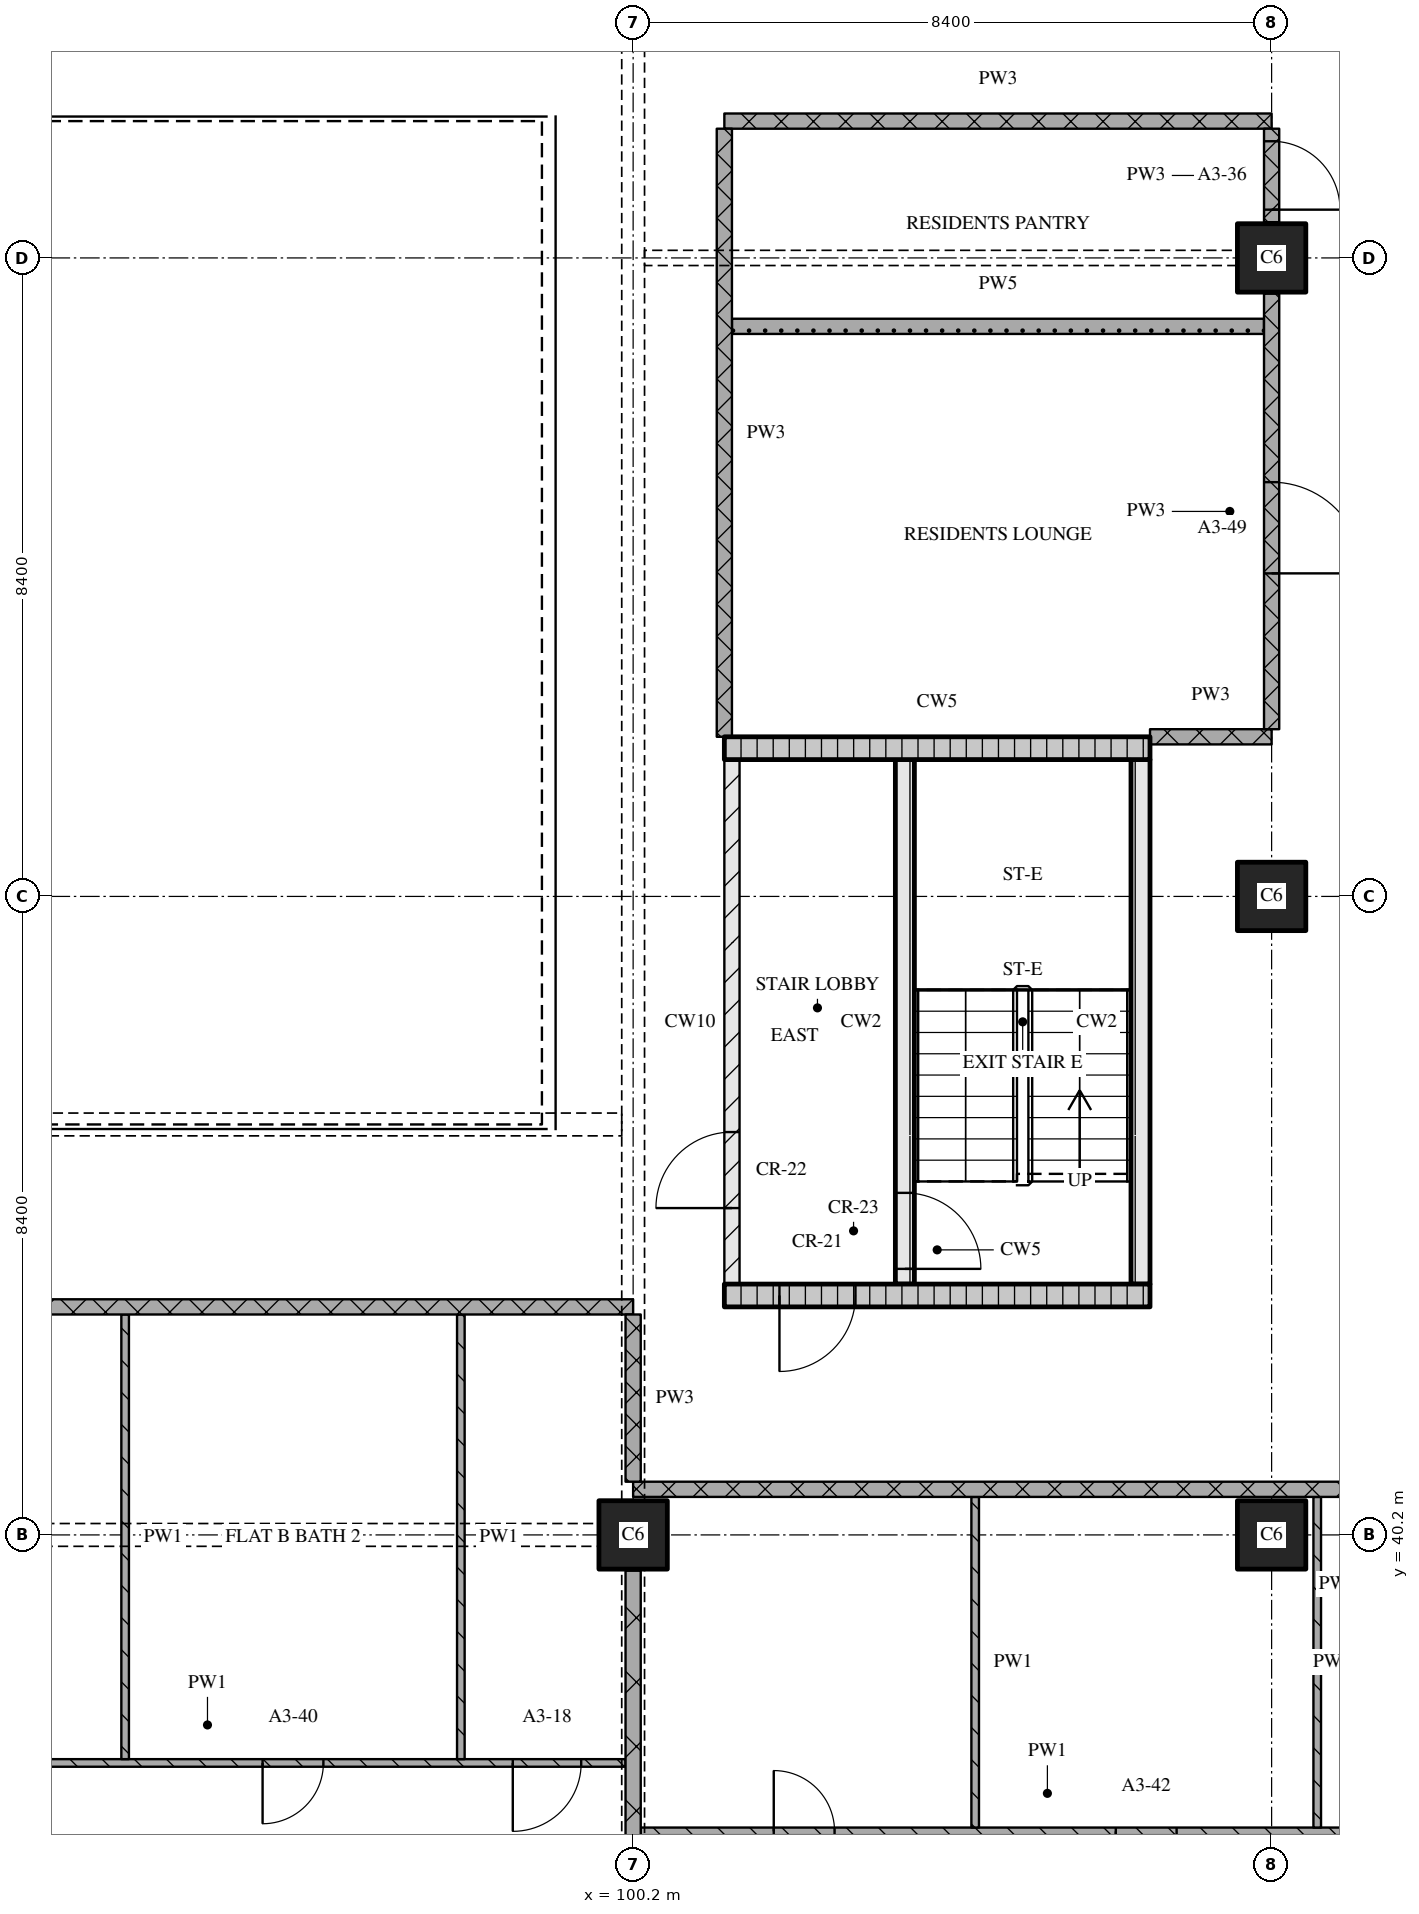
"""IFC4 building model, lengths in metres.
Left out: names, types, materials, properties, quantities, classifications, styles, units other than length and angle.
Written with IfcOpenShell. Run it as: python <this file> out.ifc"""

import sys

from ifc_helpers import new_model, si_unit, direction, frame, frame_2d, origin, origin_2d, place, context, subcontext, project, spatial, rectangle, extrude, element, fill, save


model = new_model("IFC4")
c1 = context("Model", 3, precision=1e-05, world=origin(), true_north=direction((0.0, 1.0)))
c2 = subcontext(c1, "Body", "Model", "MODEL_VIEW")
j1 = project(units=[si_unit("LENGTHUNIT", "METRE"), si_unit("PLANEANGLEUNIT", "RADIAN")], contexts=[c1])
p1 = place(None, origin())
s1 = spatial("IfcSite", under=j1, at=p1, CompositionType="ELEMENT")
p2 = place(p1, origin())
s2 = spatial("IfcBuilding", under=s1, at=p2, CompositionType="ELEMENT")
p3 = place(p2, frame((0.0, 0.0, 66.0)))
s3 = spatial("IfcBuildingStorey", under=s2, at=p3, CompositionType="ELEMENT", Elevation=66.0)
for number, where, z_axis, x_axis in (
    (1, (100.2, 40.2, 0.0), (0.0, 0.0, 1.0), (1.0, 0.0, 0.0)),
    (2, (108.6, 40.2, 0.0), (0.0, 0.0, 1.0), (1.0, 0.0, 0.0)),
    (3, (108.6, 48.6, 0.0), (0.0, 0.0, 1.0), (1.0, 0.0, 0.0)),
    (4, (108.6, 57.0, 0.0), (0.0, 0.0, 1.0), (1.0, 0.0, 0.0)),
):
    element("IfcColumn", number, at=place(p3, frame(where, z_axis=z_axis, x_axis=x_axis)), inside=s3, PredefinedType="COLUMN", context=c2, shape_type="SweptSolid", body=[
        extrude(rectangle(XDim=0.9, YDim=0.9, at=origin_2d()), origin(), (0.0, 0.0, 1.0), 3.6),
    ])
p4 = place(p3, frame((101.4, 43.35, 0.0), z_axis=(0.0, 0.0, 1.0), x_axis=(1.0, 0.0, 0.0)))
e5 = element("IfcWall", 5, at=p4, inside=s3, PredefinedType="SOLIDWALL", context=c2, shape_type="SweptSolid", body=[
    extrude(rectangle(XDim=5.6, YDim=0.3, at=frame_2d((2.8, 0.0))), origin(), (0.0, 0.0, 1.0), 3.32),
])
p5 = place(p4, frame((0.725, 0.0, 0.0)))
e6 = element("IfcOpeningElement", 6, at=p5, cuts=e5, PredefinedType="OPENING", context=c2, shape_type="SweptSolid", body=[
    extrude(rectangle(XDim=1.0, YDim=2.1, at=frame_2d((0.5, 1.05))), frame((0.0, 0.16, 0.0), z_axis=(0.0, -1.0, 0.0), x_axis=(1.0, 0.0, 0.0)), (0.0, 0.0, 1.0), 0.32),
])
p6 = place(p3, frame((101.5, 43.5, 0.0), z_axis=(0.0, 0.0, 1.0), x_axis=(0.0, 1.0, 0.0)))
e7 = element("IfcWall", 7, at=p6, inside=s3, PredefinedType="PARTITIONING", context=c2, shape_type="SweptSolid", body=[
    extrude(rectangle(XDim=6.9, YDim=0.2, at=frame_2d((3.45, 0.0))), origin(), (0.0, 0.0, 1.0), 3.32),
])
p7 = place(p6, frame((1.0, 0.0, 0.0)))
e8 = element("IfcOpeningElement", 8, at=p7, cuts=e7, PredefinedType="OPENING", context=c2, shape_type="SweptSolid", body=[
    extrude(rectangle(XDim=1.0, YDim=2.1, at=frame_2d((0.5, 1.05))), frame((0.0, 0.11, 0.0), z_axis=(0.0, -1.0, 0.0), x_axis=(1.0, 0.0, 0.0)), (0.0, 0.0, 1.0), 0.22),
])
p8 = place(p3, frame((103.775, 43.5, 0.0), z_axis=(0.0, 0.0, 1.0), x_axis=(0.0, 1.0, 0.0)))
e9 = element("IfcWall", 9, at=p8, inside=s3, PredefinedType="SOLIDWALL", context=c2, shape_type="SweptSolid", body=[
    extrude(rectangle(XDim=6.9, YDim=0.25, at=frame_2d((3.45, 0.0))), origin(), (0.0, 0.0, 1.0), 3.32),
])
p9 = place(p8, frame((0.2, 0.0, 0.0)))
e10 = element("IfcOpeningElement", 10, at=p9, cuts=e9, PredefinedType="OPENING", context=c2, shape_type="SweptSolid", body=[
    extrude(rectangle(XDim=1.0, YDim=2.1, at=frame_2d((0.5, 1.05))), frame((0.0, 0.135, 0.0), z_axis=(0.0, -1.0, 0.0), x_axis=(1.0, 0.0, 0.0)), (0.0, 0.0, 1.0), 0.27),
])
p10 = place(p3, frame((106.875, 43.5, 0.0), z_axis=(0.0, 0.0, 1.0), x_axis=(0.0, 1.0, 0.0)))
e11 = element("IfcWall", 11, at=p10, inside=s3, PredefinedType="SOLIDWALL", context=c2, shape_type="SweptSolid", body=[
    extrude(rectangle(XDim=6.9, YDim=0.25, at=frame_2d((3.45, 0.0))), origin(), (0.0, 0.0, 1.0), 3.32),
])
p11 = place(p3, frame((101.4, 50.55, 0.0), z_axis=(0.0, 0.0, 1.0), x_axis=(1.0, 0.0, 0.0)))
e12 = element("IfcWall", 12, at=p11, inside=s3, PredefinedType="SOLIDWALL", context=c2, shape_type="SweptSolid", body=[
    extrude(rectangle(XDim=5.6, YDim=0.3, at=frame_2d((2.8, 0.0))), origin(), (0.0, 0.0, 1.0), 3.32),
])
p12 = place(p3, frame((100.3, 36.3, 0.0), z_axis=(0.0, 0.0, 1.0), x_axis=(1.0, 0.0, 0.0)))
e13 = element("IfcWall", 13, at=p12, inside=s3, PredefinedType="PARTITIONING", context=c2, shape_type="SweptSolid", body=[
    extrude(rectangle(XDim=10.7, YDim=0.1, at=frame_2d((5.35, 0.0))), origin(), (0.0, 0.0, 1.0), 3.32),
])
p13 = place(p12, frame((1.75, 0.0, 0.0)))
e14 = element("IfcOpeningElement", 14, at=p13, cuts=e13, PredefinedType="OPENING", context=c2, shape_type="SweptSolid", body=[
    extrude(rectangle(XDim=0.8, YDim=2.1, at=frame_2d((0.4, 1.05))), frame((0.0, 0.06, 0.0), z_axis=(0.0, -1.0, 0.0), x_axis=(1.0, 0.0, 0.0)), (0.0, 0.0, 1.0), 0.12),
])
p14 = place(p12, frame((6.25, 0.0, 0.0)))
e15 = element("IfcOpeningElement", 15, at=p14, cuts=e13, PredefinedType="OPENING", context=c2, shape_type="SweptSolid", body=[
    extrude(rectangle(XDim=0.8, YDim=2.1, at=frame_2d((0.4, 1.05))), frame((0.0, 0.06, 0.0), z_axis=(0.0, -1.0, 0.0), x_axis=(1.0, 0.0, 0.0)), (0.0, 0.0, 1.0), 0.12),
])
p15 = place(p3, frame((89.1, 37.2, 0.0), z_axis=(0.0, 0.0, 1.0), x_axis=(1.0, 0.0, 0.0)))
e16 = element("IfcWall", 16, at=p15, inside=s3, PredefinedType="PARTITIONING", context=c2, shape_type="SweptSolid", body=[
    extrude(rectangle(XDim=11.0, YDim=0.1, at=frame_2d((5.5, 0.0))), origin(), (0.0, 0.0, 1.0), 3.32),
])
p16 = place(p15, frame((6.225, 0.0, 0.0)))
e17 = element("IfcOpeningElement", 17, at=p16, cuts=e16, PredefinedType="OPENING", context=c2, shape_type="SweptSolid", body=[
    extrude(rectangle(XDim=0.8, YDim=2.1, at=frame_2d((0.4, 1.05))), frame((0.0, 0.06, 0.0), z_axis=(0.0, -1.0, 0.0), x_axis=(1.0, 0.0, 0.0)), (0.0, 0.0, 1.0), 0.12),
])
p17 = place(p15, frame((9.517, 0.0, 0.0)))
e18 = element("IfcOpeningElement", 18, at=p17, cuts=e16, PredefinedType="OPENING", context=c2, shape_type="SweptSolid", body=[
    extrude(rectangle(XDim=0.9, YDim=2.1, at=frame_2d((0.45, 1.05))), frame((0.0, 0.06, 0.0), z_axis=(0.0, -1.0, 0.0), x_axis=(1.0, 0.0, 0.0)), (0.0, 0.0, 1.0), 0.12),
])
p18 = place(p3, frame((124.28, 40.8, 0.0), z_axis=(0.0, 0.0, 1.0), x_axis=(-1.0, 0.0, 0.0)))
e19 = element("IfcWall", 19, at=p18, inside=s3, PredefinedType="PARTITIONING", context=c2, shape_type="SweptSolid", body=[
    extrude(rectangle(XDim=24.08, YDim=0.2, at=frame_2d((12.04, 0.0))), origin(), (0.0, 0.0, 1.0), 3.32),
])
p19 = place(p18, frame((12.03, 0.0, 0.0)))
e20 = element("IfcOpeningElement", 20, at=p19, cuts=e19, PredefinedType="OPENING", context=c2, shape_type="SweptSolid", body=[
    extrude(rectangle(XDim=1.0, YDim=2.1, at=frame_2d((0.5, 1.05))), frame((0.0, 0.11, 0.0), z_axis=(0.0, -1.0, 0.0), x_axis=(1.0, 0.0, 0.0)), (0.0, 0.0, 1.0), 0.22),
])
p20 = place(p3, frame((100.2, 43.2, 0.0), z_axis=(0.0, 0.0, 1.0), x_axis=(-1.0, 0.0, 0.0)))
e21 = element("IfcWall", 21, at=p20, inside=s3, PredefinedType="PARTITIONING", context=c2, shape_type="SweptSolid", body=[
    extrude(rectangle(XDim=25.2, YDim=0.2, at=frame_2d((12.6, 0.0))), origin(), (0.0, 0.0, 1.0), 3.32),
])
p21 = place(p20, frame((11.35, 0.0, 0.0)))
e22 = element("IfcOpeningElement", 22, at=p21, cuts=e21, PredefinedType="OPENING", context=c2, shape_type="SweptSolid", body=[
    extrude(rectangle(XDim=1.0, YDim=2.1, at=frame_2d((0.5, 1.05))), frame((0.0, 0.11, 0.0), z_axis=(0.0, -1.0, 0.0), x_axis=(1.0, 0.0, 0.0)), (0.0, 0.0, 1.0), 0.22),
])
p22 = place(p3, frame((107.0, 50.7, 0.0), z_axis=(0.0, 0.0, 1.0), x_axis=(1.0, 0.0, 0.0)))
e23 = element("IfcWall", 23, at=p22, inside=s3, PredefinedType="PARTITIONING", context=c2, shape_type="SweptSolid", body=[
    extrude(rectangle(XDim=1.6, YDim=0.2, at=frame_2d((0.8, 0.0))), origin(), (0.0, 0.0, 1.0), 3.32),
])
p23 = place(p3, frame((101.5, 56.1, 0.0), z_axis=(0.0, 0.0, 1.0), x_axis=(1.0, 0.0, 0.0)))
e24 = element("IfcWall", 24, at=p23, inside=s3, PredefinedType="PARTITIONING", context=c2, shape_type="SweptSolid", body=[
    extrude(rectangle(XDim=7.0, YDim=0.2, at=frame_2d((3.5, 0.0))), origin(), (0.0, 0.0, 1.0), 3.32),
])
p24 = place(p3, frame((101.4, 58.8, 0.0), z_axis=(0.0, 0.0, 1.0), x_axis=(1.0, 0.0, 0.0)))
e25 = element("IfcWall", 25, at=p24, inside=s3, PredefinedType="PARTITIONING", context=c2, shape_type="SweptSolid", body=[
    extrude(rectangle(XDim=7.2, YDim=0.2, at=frame_2d((3.6, 0.0))), origin(), (0.0, 0.0, 1.0), 3.32),
])
for number, where, z_axis, x_axis in (
    (26, (93.517, 43.1, 0.0), (0.0, 0.0, 1.0), (0.0, -1.0, 0.0)),
    (27, (97.933, 43.1, 0.0), (0.0, 0.0, 1.0), (0.0, -1.0, 0.0)),
):
    element("IfcWall", number, at=place(p3, frame(where, z_axis=z_axis, x_axis=x_axis)), inside=s3, PredefinedType="PARTITIONING", context=c2, shape_type="SweptSolid", body=[
        extrude(rectangle(XDim=5.85, YDim=0.1, at=frame_2d((2.925, 0.0))), origin(), (0.0, 0.0, 1.0), 3.32),
    ])
p25 = place(p3, frame((100.2, 43.1, 0.0), z_axis=(0.0, 0.0, 1.0), x_axis=(0.0, -1.0, 0.0)))
e28 = element("IfcWall", 28, at=p25, inside=s3, PredefinedType="PARTITIONING", context=c2, shape_type="SweptSolid", body=[
    extrude(rectangle(XDim=2.2, YDim=0.2, at=frame_2d((1.1, 0.0))), origin(), (0.0, 0.0, 1.0), 2.43),
])
p26 = place(p3, frame((100.2, 39.73, 0.0), z_axis=(0.0, 0.0, 1.0), x_axis=(0.0, -1.0, 0.0)))
e29 = element("IfcWall", 29, at=p26, inside=s3, PredefinedType="PARTITIONING", context=c2, shape_type="SweptSolid", body=[
    extrude(rectangle(XDim=7.46, YDim=0.2, at=frame_2d((3.73, 0.0))), origin(), (0.0, 0.0, 1.0), 2.83),
])
p27 = place(p3, frame((101.4, 58.7, 0.0), z_axis=(0.0, 0.0, 1.0), x_axis=(0.0, -1.0, 0.0)))
e30 = element("IfcWall", 30, at=p27, inside=s3, PredefinedType="PARTITIONING", context=c2, shape_type="SweptSolid", body=[
    extrude(rectangle(XDim=8.0, YDim=0.2, at=frame_2d((4.0, 0.0))), origin(), (0.0, 0.0, 1.0), 3.32),
])
p28 = place(p3, frame((104.7, 40.7, 0.0), z_axis=(0.0, 0.0, 1.0), x_axis=(0.0, -1.0, 0.0)))
e31 = element("IfcWall", 31, at=p28, inside=s3, PredefinedType="PARTITIONING", context=c2, shape_type="SweptSolid", body=[
    extrude(rectangle(XDim=4.35, YDim=0.1, at=frame_2d((2.175, 0.0))), origin(), (0.0, 0.0, 1.0), 3.32),
])
p29 = place(p3, frame((108.6, 50.8, 0.0), z_axis=(0.0, 0.0, 1.0), x_axis=(0.0, 1.0, 0.0)))
e32 = element("IfcWall", 32, at=p29, inside=s3, PredefinedType="PARTITIONING", context=c2, shape_type="SweptSolid", body=[
    extrude(rectangle(XDim=5.73, YDim=0.2, at=frame_2d((2.865, 0.0))), origin(), (0.0, 0.0, 1.0), 3.32),
])
p30 = place(p29, frame((2.05, 0.0, 0.0)))
e33 = element("IfcOpeningElement", 33, at=p30, cuts=e32, PredefinedType="OPENING", context=c2, shape_type="SweptSolid", body=[
    extrude(rectangle(XDim=1.2, YDim=2.1, at=frame_2d((0.6, 1.05))), frame((0.0, 0.11, 0.0), z_axis=(0.0, -1.0, 0.0), x_axis=(1.0, 0.0, 0.0)), (0.0, 0.0, 1.0), 0.22),
])
p31 = place(p3, frame((108.6, 57.47, 0.0), z_axis=(0.0, 0.0, 1.0), x_axis=(0.0, 1.0, 0.0)))
e34 = element("IfcWall", 34, at=p31, inside=s3, PredefinedType="PARTITIONING", context=c2, shape_type="SweptSolid", body=[
    extrude(rectangle(XDim=1.23, YDim=0.2, at=frame_2d((0.615, 0.0))), origin(), (0.0, 0.0, 1.0), 3.32),
])
p32 = place(p31, frame((0.165, 0.0, 0.0)))
e35 = element("IfcOpeningElement", 35, at=p32, cuts=e34, PredefinedType="OPENING", context=c2, shape_type="SweptSolid", body=[
    extrude(rectangle(XDim=0.9, YDim=2.1, at=frame_2d((0.45, 1.05))), frame((0.0, 0.11, 0.0), z_axis=(0.0, -1.0, 0.0), x_axis=(1.0, 0.0, 0.0)), (0.0, 0.0, 1.0), 0.22),
])
p33 = place(p3, frame((109.2, 40.7, 0.0), z_axis=(0.0, 0.0, 1.0), x_axis=(0.0, -1.0, 0.0)))
e36 = element("IfcWall", 36, at=p33, inside=s3, PredefinedType="PARTITIONING", context=c2, shape_type="SweptSolid", body=[
    extrude(rectangle(XDim=4.35, YDim=0.1, at=frame_2d((2.175, 0.0))), origin(), (0.0, 0.0, 1.0), 3.32),
])
p34 = place(p5, origin())
e37 = element("IfcDoor", 37, at=p34, inside=s3, OperationType="SINGLE_SWING_RIGHT", PredefinedType="DOOR", context=c2, shape_type="SweptSolid", body=[
    extrude(rectangle(XDim=1.0, YDim=2.1, at=frame_2d((0.5, 1.05))), frame((0.0, 0.025, 0.0), z_axis=(0.0, -1.0, 0.0), x_axis=(1.0, 0.0, 0.0)), (0.0, 0.0, 1.0), 0.05),
])
fill(e6, e37)
p35 = place(p9, origin())
e38 = element("IfcDoor", 38, at=p35, inside=s3, OperationType="SINGLE_SWING_RIGHT", PredefinedType="DOOR", context=c2, shape_type="SweptSolid", body=[
    extrude(rectangle(XDim=1.0, YDim=2.1, at=frame_2d((0.5, 1.05))), frame((0.0, 0.025, 0.0), z_axis=(0.0, -1.0, 0.0), x_axis=(1.0, 0.0, 0.0)), (0.0, 0.0, 1.0), 0.05),
])
fill(e10, e38)
p36 = place(p7, origin())
e39 = element("IfcDoor", 39, at=p36, inside=s3, OperationType="SINGLE_SWING_LEFT", PredefinedType="DOOR", context=c2, shape_type="SweptSolid", body=[
    extrude(rectangle(XDim=1.0, YDim=2.1, at=frame_2d((0.5, 1.05))), frame((0.0, 0.025, 0.0), z_axis=(0.0, -1.0, 0.0), x_axis=(1.0, 0.0, 0.0)), (0.0, 0.0, 1.0), 0.05),
])
fill(e8, e39)
p37 = place(p13, origin())
e40 = element("IfcDoor", 40, at=p37, inside=s3, OperationType="SINGLE_SWING_LEFT", PredefinedType="DOOR", context=c2, shape_type="SweptSolid", body=[
    extrude(rectangle(XDim=0.8, YDim=2.1, at=frame_2d((0.4, 1.05))), frame((0.0, 0.025, 0.0), z_axis=(0.0, -1.0, 0.0), x_axis=(1.0, 0.0, 0.0)), (0.0, 0.0, 1.0), 0.05),
])
fill(e14, e40)
p38 = place(p14, origin())
e41 = element("IfcDoor", 41, at=p38, inside=s3, OperationType="SINGLE_SWING_RIGHT", PredefinedType="DOOR", context=c2, shape_type="SweptSolid", body=[
    extrude(rectangle(XDim=0.8, YDim=2.1, at=frame_2d((0.4, 1.05))), frame((0.0, 0.025, 0.0), z_axis=(0.0, -1.0, 0.0), x_axis=(1.0, 0.0, 0.0)), (0.0, 0.0, 1.0), 0.05),
])
fill(e15, e41)
p39 = place(p16, origin())
e42 = element("IfcDoor", 42, at=p39, inside=s3, OperationType="SINGLE_SWING_RIGHT", PredefinedType="DOOR", context=c2, shape_type="SweptSolid", body=[
    extrude(rectangle(XDim=0.8, YDim=2.1, at=frame_2d((0.4, 1.05))), frame((0.0, 0.025, 0.0), z_axis=(0.0, -1.0, 0.0), x_axis=(1.0, 0.0, 0.0)), (0.0, 0.0, 1.0), 0.05),
])
fill(e17, e42)
p40 = place(p17, origin())
e43 = element("IfcDoor", 43, at=p40, inside=s3, OperationType="SINGLE_SWING_RIGHT", PredefinedType="DOOR", context=c2, shape_type="SweptSolid", body=[
    extrude(rectangle(XDim=0.9, YDim=2.1, at=frame_2d((0.45, 1.05))), frame((0.0, 0.025, 0.0), z_axis=(0.0, -1.0, 0.0), x_axis=(1.0, 0.0, 0.0)), (0.0, 0.0, 1.0), 0.05),
])
fill(e18, e43)
p41 = place(p30, origin())
e44 = element("IfcDoor", 44, at=p41, inside=s3, OperationType="SINGLE_SWING_RIGHT", PredefinedType="DOOR", context=c2, shape_type="SweptSolid", body=[
    extrude(rectangle(XDim=1.2, YDim=2.1, at=frame_2d((0.6, 1.05))), frame((0.0, 0.025, 0.0), z_axis=(0.0, -1.0, 0.0), x_axis=(1.0, 0.0, 0.0)), (0.0, 0.0, 1.0), 0.05),
])
fill(e33, e44)
p42 = place(p32, origin())
e45 = element("IfcDoor", 45, at=p42, inside=s3, OperationType="SINGLE_SWING_RIGHT", PredefinedType="DOOR", context=c2, shape_type="SweptSolid", body=[
    extrude(rectangle(XDim=0.9, YDim=2.1, at=frame_2d((0.45, 1.05))), frame((0.0, 0.025, 0.0), z_axis=(0.0, -1.0, 0.0), x_axis=(1.0, 0.0, 0.0)), (0.0, 0.0, 1.0), 0.05),
])
fill(e35, e45)
save(model, sys.argv[1])
